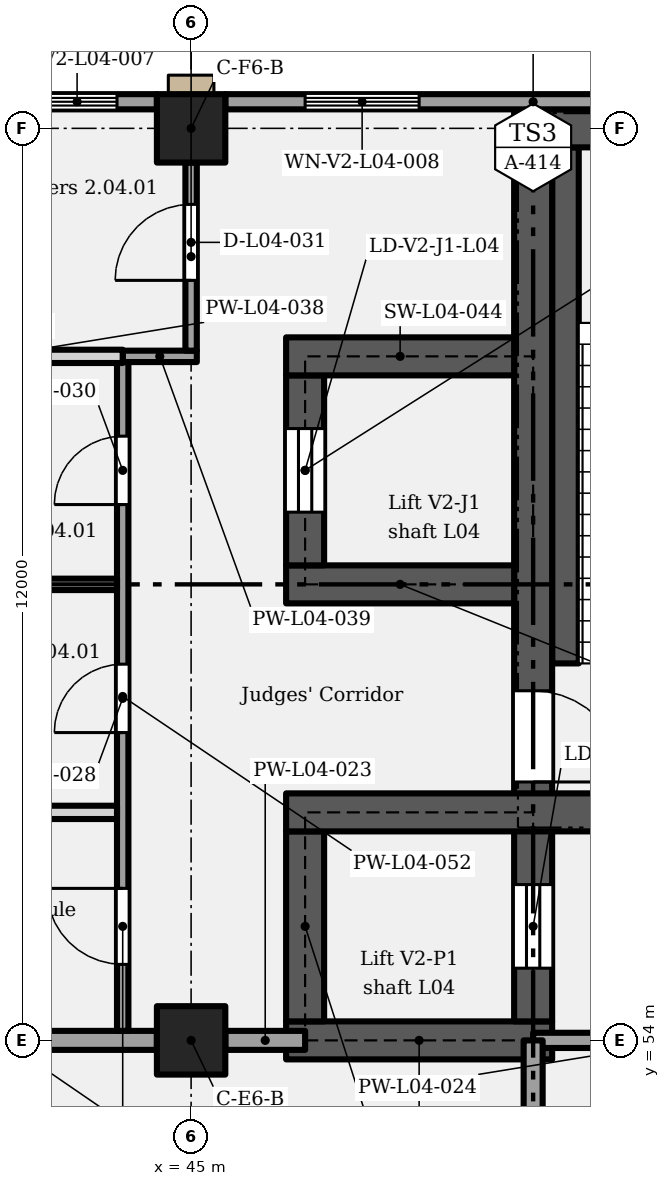
"""IFC4 building model, lengths in metres.
Left out: names, types, materials, properties, quantities, classifications, styles, units other than length and angle.
Written with IfcOpenShell. Run it as: python <this file> out.ifc"""

import sys

from ifc_helpers import new_model, si_unit, direction, frame, frame_2d, origin, origin_2d, place, context, subcontext, project, spatial, rectangle, extrude, element, fill, save


model = new_model("IFC4")
c1 = context("Model", 3, precision=1e-05, world=origin(), true_north=direction((0.0, 1.0)))
c2 = subcontext(c1, "Body", "Model", "MODEL_VIEW")
j1 = project(units=[si_unit("LENGTHUNIT", "METRE"), si_unit("PLANEANGLEUNIT", "RADIAN")], contexts=[c1])
p1 = place(None, origin())
s1 = spatial("IfcSite", under=j1, at=p1, CompositionType="ELEMENT")
p2 = place(p1, origin())
s2 = spatial("IfcBuilding", under=s1, at=p2, CompositionType="ELEMENT")
p3 = place(p2, frame((0.0, 0.0, 22.8)))
s3 = spatial("IfcBuildingStorey", under=s2, at=p3, CompositionType="ELEMENT", Elevation=22.8)
for number, where, z_axis, x_axis in (
    (1, (45.0, 54.0, 0.0), (0.0, 0.0, 1.0), (1.0, 0.0, 0.0)),
    (2, (45.0, 66.0, 0.0), (0.0, 0.0, 1.0), (1.0, 0.0, 0.0)),
):
    element("IfcColumn", number, at=place(p3, frame(where, z_axis=z_axis, x_axis=x_axis)), inside=s3, PredefinedType="COLUMN", context=c2, shape_type="SweptSolid", body=[
        extrude(rectangle(XDim=0.9, YDim=0.9, at=origin_2d()), origin(), (0.0, 0.0, 1.0), 5.4),
    ])
p4 = place(p3, frame((46.25, 54.0, 0.0), z_axis=(0.0, 0.0, 1.0), x_axis=(1.0, 0.0, 0.0)))
e3 = element("IfcWall", 3, at=p4, inside=s3, PredefinedType="SHEAR", context=c2, shape_type="SweptSolid", body=[
    extrude(rectangle(XDim=3.5, YDim=0.5, at=frame_2d((1.75, 0.0))), origin(), (0.0, 0.0, 1.0), 5.15),
])
p5 = place(p3, frame((46.5, 54.25, 0.0), z_axis=(0.0, 0.0, 1.0), x_axis=(0.0, 1.0, 0.0)))
e4 = element("IfcWall", 4, at=p5, inside=s3, PredefinedType="SHEAR", context=c2, shape_type="SweptSolid", body=[
    extrude(rectangle(XDim=2.5, YDim=0.5, at=frame_2d((1.25, 0.0))), origin(), (0.0, 0.0, 1.0), 5.15),
])
p6 = place(p3, frame((49.5, 54.25, 0.0), z_axis=(0.0, 0.0, 1.0), x_axis=(0.0, 1.0, 0.0)))
e5 = element("IfcWall", 5, at=p6, inside=s3, PredefinedType="SHEAR", context=c2, shape_type="SweptSolid", body=[
    extrude(rectangle(XDim=11.5, YDim=0.5, at=frame_2d((5.75, 0.0))), origin(), (0.0, 0.0, 1.0), 5.15),
])
p7 = place(p6, frame((0.7, 0.0, 0.0)))
e6 = element("IfcOpeningElement", 6, at=p7, cuts=e5, PredefinedType="OPENING", context=c2, shape_type="SweptSolid", body=[
    extrude(rectangle(XDim=1.1, YDim=2.1, at=frame_2d((0.55, 1.05))), frame((0.0, 0.26, 0.0), z_axis=(0.0, -1.0, 0.0), x_axis=(1.0, 0.0, 0.0)), (0.0, 0.0, 1.0), 0.52),
])
p8 = place(p6, frame((4.35, 0.0, 0.0), z_axis=(0.0, 0.0, 1.0), x_axis=(-1.0, 0.0, 0.0)))
e7 = element("IfcOpeningElement", 7, at=p8, cuts=e5, PredefinedType="OPENING", context=c2, shape_type="SweptSolid", body=[
    extrude(rectangle(XDim=1.2, YDim=2.1, at=frame_2d((0.6, 1.05))), frame((0.0, 0.26, 0.0), z_axis=(0.0, -1.0, 0.0), x_axis=(1.0, 0.0, 0.0)), (0.0, 0.0, 1.0), 0.52),
])
p9 = place(p3, frame((46.25, 57.0, 0.0), z_axis=(0.0, 0.0, 1.0), x_axis=(1.0, 0.0, 0.0)))
e8 = element("IfcWall", 8, at=p9, inside=s3, PredefinedType="SHEAR", context=c2, shape_type="SweptSolid", body=[
    extrude(rectangle(XDim=11.0, YDim=0.5, at=frame_2d((5.5, 0.0))), origin(), (0.0, 0.0, 1.0), 5.15),
])
p10 = place(p9, frame((4.9, 0.0, 0.0)))
e9 = element("IfcOpeningElement", 9, at=p10, cuts=e8, PredefinedType="OPENING", context=c2, shape_type="SweptSolid", body=[
    extrude(rectangle(XDim=1.2, YDim=2.1, at=frame_2d((0.6, 1.05))), frame((0.0, 0.26, 0.0), z_axis=(0.0, -1.0, 0.0), x_axis=(1.0, 0.0, 0.0)), (0.0, 0.0, 1.0), 0.52),
])
p11 = place(p3, frame((46.25, 60.0, 0.0), z_axis=(0.0, 0.0, 1.0), x_axis=(1.0, 0.0, 0.0)))
e10 = element("IfcWall", 10, at=p11, inside=s3, PredefinedType="SHEAR", context=c2, shape_type="SweptSolid", body=[
    extrude(rectangle(XDim=3.0, YDim=0.5, at=frame_2d((1.5, 0.0))), origin(), (0.0, 0.0, 1.0), 5.15),
])
p12 = place(p3, frame((46.5, 60.25, 0.0), z_axis=(0.0, 0.0, 1.0), x_axis=(0.0, 1.0, 0.0)))
e11 = element("IfcWall", 11, at=p12, inside=s3, PredefinedType="SHEAR", context=c2, shape_type="SweptSolid", body=[
    extrude(rectangle(XDim=2.5, YDim=0.5, at=frame_2d((1.25, 0.0))), origin(), (0.0, 0.0, 1.0), 5.15),
])
p13 = place(p12, frame((0.7, 0.0, 0.0)))
e12 = element("IfcOpeningElement", 12, at=p13, cuts=e11, PredefinedType="OPENING", context=c2, shape_type="SweptSolid", body=[
    extrude(rectangle(XDim=1.1, YDim=2.1, at=frame_2d((0.55, 1.05))), frame((0.0, 0.26, 0.0), z_axis=(0.0, -1.0, 0.0), x_axis=(1.0, 0.0, 0.0)), (0.0, 0.0, 1.0), 0.52),
])
p14 = place(p3, frame((46.25, 63.0, 0.0), z_axis=(0.0, 0.0, 1.0), x_axis=(1.0, 0.0, 0.0)))
e13 = element("IfcWall", 13, at=p14, inside=s3, PredefinedType="SHEAR", context=c2, shape_type="SweptSolid", body=[
    extrude(rectangle(XDim=3.0, YDim=0.5, at=frame_2d((1.5, 0.0))), origin(), (0.0, 0.0, 1.0), 5.15),
])
p15 = place(p3, frame((49.25, 66.0, 0.0), z_axis=(0.0, 0.0, 1.0), x_axis=(1.0, 0.0, 0.0)))
e14 = element("IfcWall", 14, at=p15, inside=s3, PredefinedType="SHEAR", context=c2, shape_type="SweptSolid", body=[
    extrude(rectangle(XDim=4.3, YDim=0.5, at=frame_2d((2.15, 0.0))), origin(), (0.0, 0.0, 1.0), 5.15),
])
p16 = place(p3, frame((36.45, 66.35, 0.0), z_axis=(0.0, 0.0, 1.0), x_axis=(1.0, 0.0, 0.0)))
e15 = element("IfcWall", 15, at=p16, inside=s3, PredefinedType="SOLIDWALL", context=c2, shape_type="SweptSolid", body=[
    extrude(rectangle(XDim=8.1, YDim=0.2, at=frame_2d((4.05, 0.0))), origin(), (0.0, 0.0, 1.0), 5.15),
])
p17 = place(p16, frame((6.525, 0.0, 1.05)))
e16 = element("IfcOpeningElement", 16, at=p17, cuts=e15, PredefinedType="OPENING", context=c2, shape_type="SweptSolid", body=[
    extrude(rectangle(XDim=1.05, YDim=2.4, at=frame_2d((0.525, 1.2))), frame((0.0, 0.11, 0.0), z_axis=(0.0, -1.0, 0.0), x_axis=(1.0, 0.0, 0.0)), (0.0, 0.0, 1.0), 0.22),
])
p18 = place(p3, frame((45.45, 66.35, 0.0), z_axis=(0.0, 0.0, 1.0), x_axis=(1.0, 0.0, 0.0)))
e17 = element("IfcWall", 17, at=p18, inside=s3, PredefinedType="SOLIDWALL", context=c2, shape_type="SweptSolid", body=[
    extrude(rectangle(XDim=8.1, YDim=0.2, at=frame_2d((4.05, 0.0))), origin(), (0.0, 0.0, 1.0), 5.15),
])
p19 = place(p18, frame((1.05, 0.0, 1.05)))
e18 = element("IfcOpeningElement", 18, at=p19, cuts=e17, PredefinedType="OPENING", context=c2, shape_type="SweptSolid", body=[
    extrude(rectangle(XDim=1.5, YDim=3.5, at=frame_2d((0.75, 1.75))), frame((0.0, 0.11, 0.0), z_axis=(0.0, -1.0, 0.0), x_axis=(1.0, 0.0, 0.0)), (0.0, 0.0, 1.0), 0.22),
])
p20 = place(p3, frame((40.5, 54.0, 0.0), z_axis=(0.0, 0.0, 1.0), x_axis=(1.0, 0.0, 0.0)))
e19 = element("IfcWall", 19, at=p20, inside=s3, PredefinedType="PARTITIONING", context=c2, shape_type="SweptSolid", body=[
    extrude(rectangle(XDim=4.05, YDim=0.25, at=frame_2d((2.025, 0.0))), origin(), (0.0, 0.0, 1.0), 4.4),
])
p21 = place(p20, frame((2.3, 0.0, 0.0), z_axis=(0.0, 0.0, 1.0), x_axis=(-1.0, 0.0, 0.0)))
e20 = element("IfcOpeningElement", 20, at=p21, cuts=e19, PredefinedType="OPENING", context=c2, shape_type="SweptSolid", body=[
    extrude(rectangle(XDim=1.0, YDim=2.1, at=frame_2d((0.5, 1.05))), frame((0.0, 0.135, 0.0), z_axis=(0.0, -1.0, 0.0), x_axis=(1.0, 0.0, 0.0)), (0.0, 0.0, 1.0), 0.27),
])
p22 = place(p3, frame((45.45, 54.0, 0.0), z_axis=(0.0, 0.0, 1.0), x_axis=(1.0, 0.0, 0.0)))
e21 = element("IfcWall", 21, at=p22, inside=s3, PredefinedType="PARTITIONING", context=c2, shape_type="SweptSolid", body=[
    extrude(rectangle(XDim=1.05, YDim=0.25, at=frame_2d((0.525, 0.0))), origin(), (0.0, 0.0, 1.0), 4.4),
])
p23 = place(p3, frame((49.5, 54.0, 0.0), z_axis=(0.0, 0.0, 1.0), x_axis=(1.0, 0.0, 0.0)))
e22 = element("IfcWall", 22, at=p23, inside=s3, PredefinedType="PARTITIONING", context=c2, shape_type="SweptSolid", body=[
    extrude(rectangle(XDim=4.05, YDim=0.2, at=frame_2d((2.025, 0.0))), origin(), (0.0, 0.0, 1.0), 4.4),
])
p24 = place(p23, frame((1.35, 0.0, 0.0)))
e23 = element("IfcOpeningElement", 23, at=p24, cuts=e22, PredefinedType="OPENING", context=c2, shape_type="SweptSolid", body=[
    extrude(rectangle(XDim=1.8, YDim=2.1, at=frame_2d((0.9, 1.05))), frame((0.0, 0.11, 0.0), z_axis=(0.0, -1.0, 0.0), x_axis=(1.0, 0.0, 0.0)), (0.0, 0.0, 1.0), 0.22),
])
p25 = place(p3, frame((40.75, 57.0, 0.0), z_axis=(0.0, 0.0, 1.0), x_axis=(1.0, 0.0, 0.0)))
e24 = element("IfcWall", 24, at=p25, inside=s3, PredefinedType="PARTITIONING", context=c2, shape_type="SweptSolid", body=[
    extrude(rectangle(XDim=3.275, YDim=0.175, at=frame_2d((1.637, 0.0))), origin(), (0.0, 0.0, 1.0), 5.15),
])
p26 = place(p25, frame((2.0, 0.0, 0.0), z_axis=(0.0, 0.0, 1.0), x_axis=(-1.0, 0.0, 0.0)))
e25 = element("IfcOpeningElement", 25, at=p26, cuts=e24, PredefinedType="OPENING", context=c2, shape_type="SweptSolid", body=[
    extrude(rectangle(XDim=0.9, YDim=2.1, at=frame_2d((0.45, 1.05))), frame((0.0, 0.097, 0.0), z_axis=(0.0, -1.0, 0.0), x_axis=(1.0, 0.0, 0.0)), (0.0, 0.0, 1.0), 0.195),
])
p27 = place(p3, frame((40.75, 60.0, 0.0), z_axis=(0.0, 0.0, 1.0), x_axis=(1.0, 0.0, 0.0)))
e26 = element("IfcWall", 26, at=p27, inside=s3, PredefinedType="PARTITIONING", context=c2, shape_type="SweptSolid", body=[
    extrude(rectangle(XDim=3.275, YDim=0.15, at=frame_2d((1.637, 0.0))), origin(), (0.0, 0.0, 1.0), 5.15),
])
p28 = place(p3, frame((40.75, 63.0, 0.0), z_axis=(0.0, 0.0, 1.0), x_axis=(1.0, 0.0, 0.0)))
e27 = element("IfcWall", 27, at=p28, inside=s3, PredefinedType="PARTITIONING", context=c2, shape_type="SweptSolid", body=[
    extrude(rectangle(XDim=3.35, YDim=0.175, at=frame_2d((1.675, 0.0))), origin(), (0.0, 0.0, 1.0), 5.15),
])
p29 = place(p3, frame((44.1, 63.0, 0.0), z_axis=(0.0, 0.0, 1.0), x_axis=(1.0, 0.0, 0.0)))
e28 = element("IfcWall", 28, at=p29, inside=s3, PredefinedType="PARTITIONING", context=c2, shape_type="SweptSolid", body=[
    extrude(rectangle(XDim=0.975, YDim=0.15, at=frame_2d((0.487, 0.0))), origin(), (0.0, 0.0, 1.0), 5.15),
])
p30 = place(p3, frame((44.1, 54.125, 0.0), z_axis=(0.0, 0.0, 1.0), x_axis=(0.0, 1.0, 0.0)))
e29 = element("IfcWall", 29, at=p30, inside=s3, PredefinedType="PARTITIONING", context=c2, shape_type="SweptSolid", body=[
    extrude(rectangle(XDim=8.8, YDim=0.15, at=frame_2d((4.4, 0.0))), origin(), (0.0, 0.0, 1.0), 5.15),
])
p31 = place(p30, frame((0.875, 0.0, 0.0)))
e30 = element("IfcOpeningElement", 30, at=p31, cuts=e29, PredefinedType="OPENING", context=c2, shape_type="SweptSolid", body=[
    extrude(rectangle(XDim=1.0, YDim=2.1, at=frame_2d((0.5, 1.05))), frame((0.0, 0.085, 0.0), z_axis=(0.0, -1.0, 0.0), x_axis=(1.0, 0.0, 0.0)), (0.0, 0.0, 1.0), 0.17),
])
p32 = place(p30, frame((3.925, 0.0, 0.0)))
e31 = element("IfcOpeningElement", 31, at=p32, cuts=e29, PredefinedType="OPENING", context=c2, shape_type="SweptSolid", body=[
    extrude(rectangle(XDim=0.9, YDim=2.1, at=frame_2d((0.45, 1.05))), frame((0.0, 0.085, 0.0), z_axis=(0.0, -1.0, 0.0), x_axis=(1.0, 0.0, 0.0)), (0.0, 0.0, 1.0), 0.17),
])
p33 = place(p30, frame((6.925, 0.0, 0.0)))
e32 = element("IfcOpeningElement", 32, at=p33, cuts=e29, PredefinedType="OPENING", context=c2, shape_type="SweptSolid", body=[
    extrude(rectangle(XDim=0.9, YDim=2.1, at=frame_2d((0.45, 1.05))), frame((0.0, 0.085, 0.0), z_axis=(0.0, -1.0, 0.0), x_axis=(1.0, 0.0, 0.0)), (0.0, 0.0, 1.0), 0.17),
])
p34 = place(p3, frame((45.0, 63.075, 0.0), z_axis=(0.0, 0.0, 1.0), x_axis=(0.0, 1.0, 0.0)))
e33 = element("IfcWall", 33, at=p34, inside=s3, PredefinedType="PARTITIONING", context=c2, shape_type="SweptSolid", body=[
    extrude(rectangle(XDim=2.475, YDim=0.15, at=frame_2d((1.238, 0.0))), origin(), (0.0, 0.0, 1.0), 4.4),
])
p35 = place(p34, frame((0.925, 0.0, 0.0)))
e34 = element("IfcOpeningElement", 34, at=p35, cuts=e33, PredefinedType="OPENING", context=c2, shape_type="SweptSolid", body=[
    extrude(rectangle(XDim=1.0, YDim=2.1, at=frame_2d((0.5, 1.05))), frame((0.0, 0.085, 0.0), z_axis=(0.0, -1.0, 0.0), x_axis=(1.0, 0.0, 0.0)), (0.0, 0.0, 1.0), 0.17),
])
p36 = place(p3, frame((49.5, 43.5, 0.0), z_axis=(0.0, 0.0, 1.0), x_axis=(0.0, 1.0, 0.0)))
e35 = element("IfcWall", 35, at=p36, inside=s3, PredefinedType="PARTITIONING", context=c2, shape_type="SweptSolid", body=[
    extrude(rectangle(XDim=10.5, YDim=0.25, at=frame_2d((5.25, 0.0))), origin(), (0.0, 0.0, 1.0), 5.15),
])
p37 = place(p36, frame((0.6, 0.0, 0.0)))
e36 = element("IfcOpeningElement", 36, at=p37, cuts=e35, PredefinedType="OPENING", context=c2, shape_type="SweptSolid", body=[
    extrude(rectangle(XDim=1.8, YDim=2.4, at=frame_2d((0.9, 1.2))), frame((0.0, 0.135, 0.0), z_axis=(0.0, -1.0, 0.0), x_axis=(1.0, 0.0, 0.0)), (0.0, 0.0, 1.0), 0.27),
])
p38 = place(p36, frame((7.1, 0.0, 0.0)))
e37 = element("IfcOpeningElement", 37, at=p38, cuts=e35, PredefinedType="OPENING", context=c2, shape_type="SweptSolid", body=[
    extrude(rectangle(XDim=1.8, YDim=2.4, at=frame_2d((0.9, 1.2))), frame((0.0, 0.135, 0.0), z_axis=(0.0, -1.0, 0.0), x_axis=(1.0, 0.0, 0.0)), (0.0, 0.0, 1.0), 0.27),
])
p39 = place(p3, frame((49.925, 58.96, 0.0), z_axis=(0.0, 0.0, 1.0), x_axis=(0.0, 1.0, 0.0)))
e38 = element("IfcWall", 38, at=p39, inside=s3, PredefinedType="SHEAR", context=c2, shape_type="SweptSolid", body=[
    extrude(rectangle(XDim=6.79, YDim=0.35, at=frame_2d((3.395, 0.0))), origin(), (0.0, 0.0, 1.0), 2.587),
])
p40 = place(p17, origin())
e39 = element("IfcWindow", 39, at=p40, inside=s3, PartitioningType="SINGLE_PANEL", PredefinedType="WINDOW", context=c2, shape_type="SweptSolid", body=[
    extrude(rectangle(XDim=1.05, YDim=2.4, at=frame_2d((0.525, 1.2))), frame((0.0, 0.03, 0.0), z_axis=(0.0, -1.0, 0.0), x_axis=(1.0, 0.0, 0.0)), (0.0, 0.0, 1.0), 0.06),
])
fill(e16, e39)
p41 = place(p19, origin())
e40 = element("IfcWindow", 40, at=p41, inside=s3, PartitioningType="SINGLE_PANEL", PredefinedType="WINDOW", context=c2, shape_type="SweptSolid", body=[
    extrude(rectangle(XDim=1.5, YDim=3.5, at=frame_2d((0.75, 1.75))), frame((0.0, 0.03, 0.0), z_axis=(0.0, -1.0, 0.0), x_axis=(1.0, 0.0, 0.0)), (0.0, 0.0, 1.0), 0.06),
])
fill(e18, e40)
p42 = place(p7, origin())
e41 = element("IfcDoor", 41, at=p42, inside=s3, OperationType="SLIDING_TO_LEFT", PredefinedType="DOOR", context=c2, shape_type="SweptSolid", body=[
    extrude(rectangle(XDim=1.1, YDim=2.1, at=frame_2d((0.55, 1.05))), frame((0.0, 0.025, 0.0), z_axis=(0.0, -1.0, 0.0), x_axis=(1.0, 0.0, 0.0)), (0.0, 0.0, 1.0), 0.05),
])
fill(e6, e41)
p43 = place(p13, origin())
e42 = element("IfcDoor", 42, at=p43, inside=s3, OperationType="SLIDING_TO_LEFT", PredefinedType="DOOR", context=c2, shape_type="SweptSolid", body=[
    extrude(rectangle(XDim=1.1, YDim=2.1, at=frame_2d((0.55, 1.05))), frame((0.0, 0.025, 0.0), z_axis=(0.0, -1.0, 0.0), x_axis=(1.0, 0.0, 0.0)), (0.0, 0.0, 1.0), 0.05),
])
fill(e12, e42)
p44 = place(p8, origin())
e43 = element("IfcDoor", 43, at=p44, inside=s3, OperationType="SINGLE_SWING_RIGHT", PredefinedType="DOOR", context=c2, shape_type="SweptSolid", body=[
    extrude(rectangle(XDim=1.2, YDim=2.1, at=frame_2d((0.6, 1.05))), frame((0.0, 0.025, 0.0), z_axis=(0.0, -1.0, 0.0), x_axis=(1.0, 0.0, 0.0)), (0.0, 0.0, 1.0), 0.05),
])
fill(e7, e43)
p45 = place(p31, origin())
e44 = element("IfcDoor", 44, at=p45, inside=s3, OperationType="SINGLE_SWING_RIGHT", PredefinedType="DOOR", context=c2, shape_type="SweptSolid", body=[
    extrude(rectangle(XDim=1.0, YDim=2.1, at=frame_2d((0.5, 1.05))), frame((0.0, 0.025, 0.0), z_axis=(0.0, -1.0, 0.0), x_axis=(1.0, 0.0, 0.0)), (0.0, 0.0, 1.0), 0.05),
])
fill(e30, e44)
p46 = place(p32, origin())
e45 = element("IfcDoor", 45, at=p46, inside=s3, OperationType="SINGLE_SWING_LEFT", PredefinedType="DOOR", context=c2, shape_type="SweptSolid", body=[
    extrude(rectangle(XDim=0.9, YDim=2.1, at=frame_2d((0.45, 1.05))), frame((0.0, 0.025, 0.0), z_axis=(0.0, -1.0, 0.0), x_axis=(1.0, 0.0, 0.0)), (0.0, 0.0, 1.0), 0.05),
])
fill(e31, e45)
p47 = place(p33, origin())
e46 = element("IfcDoor", 46, at=p47, inside=s3, OperationType="SINGLE_SWING_LEFT", PredefinedType="DOOR", context=c2, shape_type="SweptSolid", body=[
    extrude(rectangle(XDim=0.9, YDim=2.1, at=frame_2d((0.45, 1.05))), frame((0.0, 0.025, 0.0), z_axis=(0.0, -1.0, 0.0), x_axis=(1.0, 0.0, 0.0)), (0.0, 0.0, 1.0), 0.05),
])
fill(e32, e46)
p48 = place(p35, origin())
e47 = element("IfcDoor", 47, at=p48, inside=s3, OperationType="SINGLE_SWING_LEFT", PredefinedType="DOOR", context=c2, shape_type="SweptSolid", body=[
    extrude(rectangle(XDim=1.0, YDim=2.1, at=frame_2d((0.5, 1.05))), frame((0.0, 0.025, 0.0), z_axis=(0.0, -1.0, 0.0), x_axis=(1.0, 0.0, 0.0)), (0.0, 0.0, 1.0), 0.05),
])
fill(e34, e47)
save(model, sys.argv[1])
